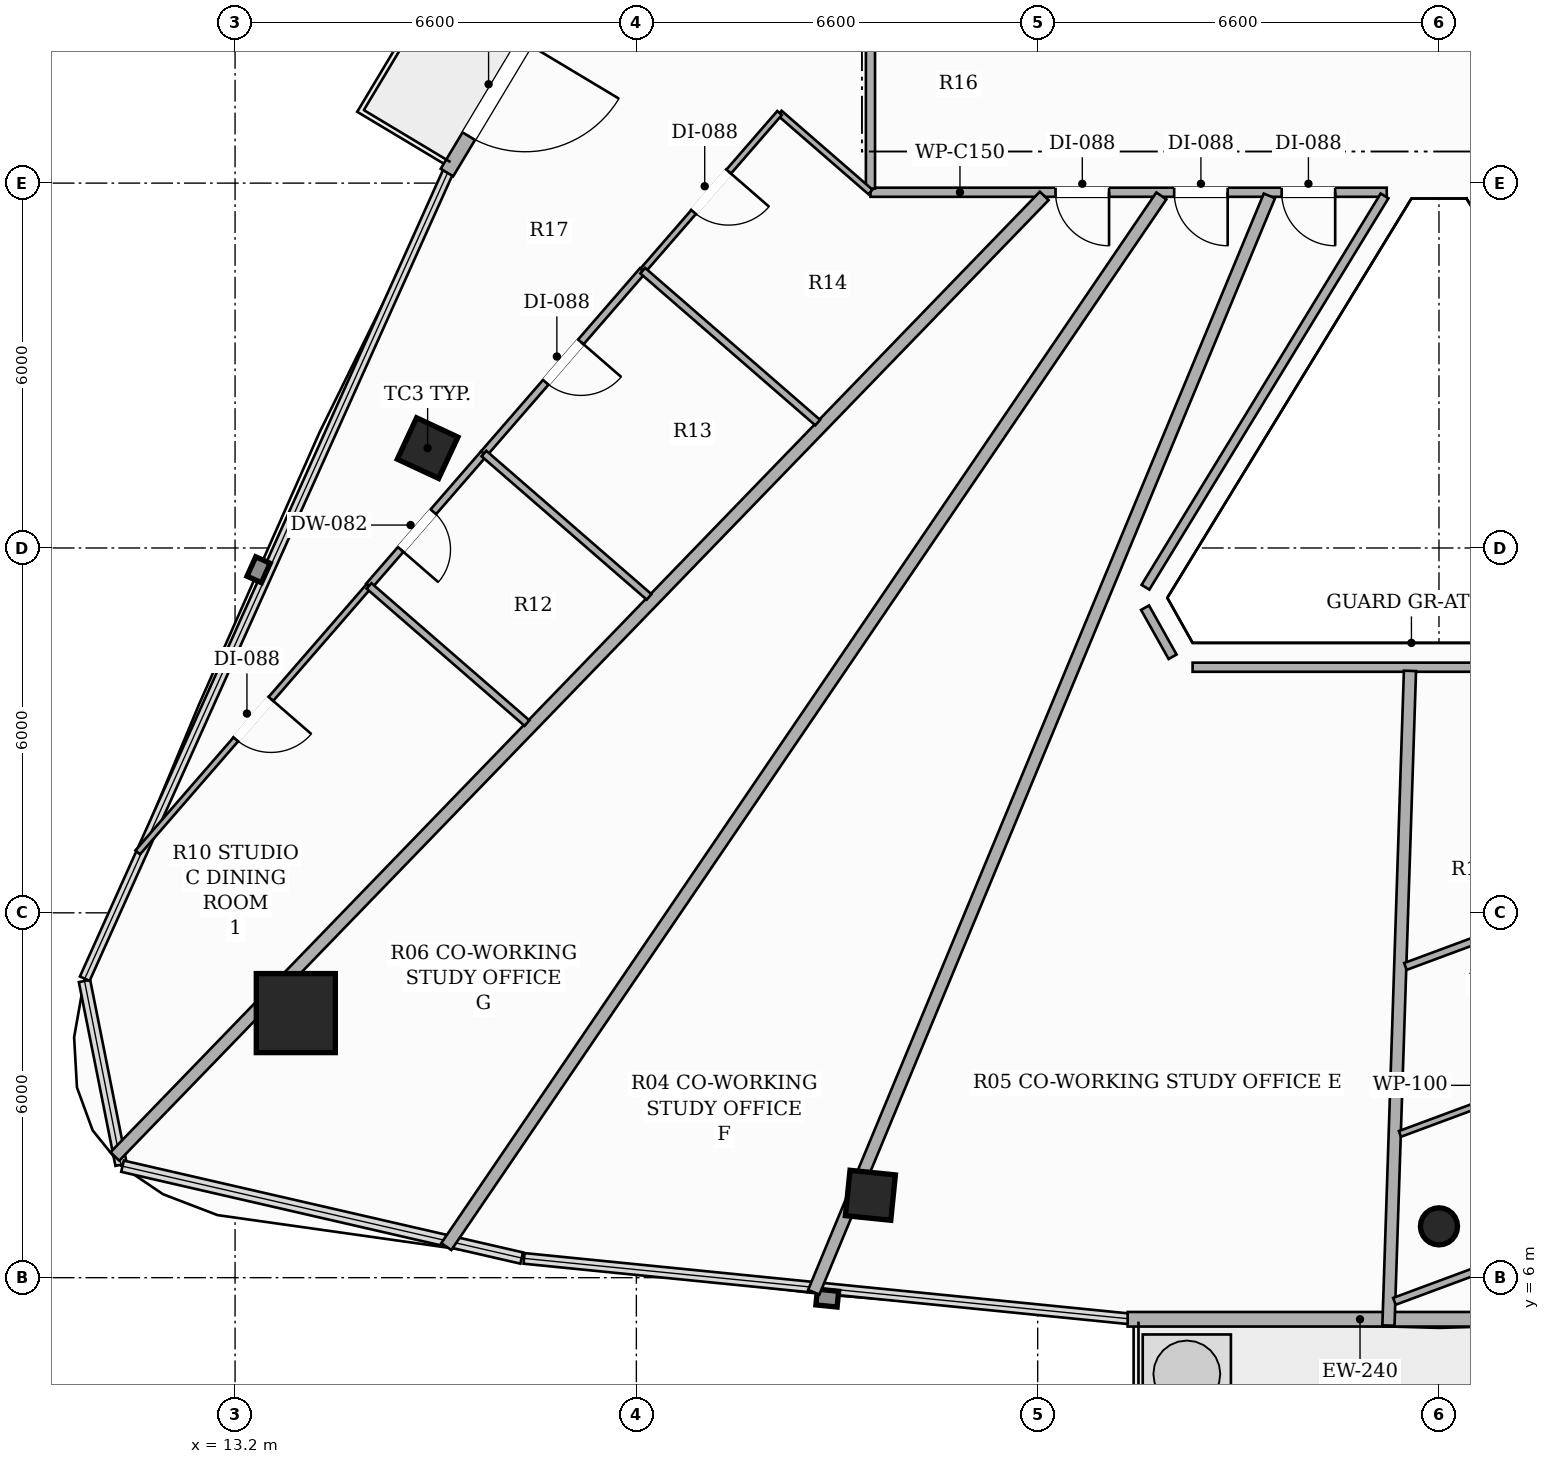
"""IFC4 building model, lengths in metres.
Left out: names, types, materials, properties, quantities, classifications, styles, units other than length and angle.
Written with IfcOpenShell. Run it as: python <this file> out.ifc"""

import sys

from ifc_helpers import new_model, si_unit, direction, frame, frame_2d, origin, origin_2d, place, context, subcontext, project, spatial, rectangle, hollow_rectangle, hollow_circle, extrude, element, fill, save


model = new_model("IFC4")
c1 = context("Model", 3, precision=1e-05, world=origin(), true_north=direction((0.0, 1.0)))
c2 = subcontext(c1, "Body", "Model", "MODEL_VIEW")
j1 = project(units=[si_unit("LENGTHUNIT", "METRE"), si_unit("PLANEANGLEUNIT", "RADIAN")], contexts=[c1])
p1 = place(None, origin())
s1 = spatial("IfcSite", under=j1, at=p1, CompositionType="ELEMENT")
p2 = place(p1, origin())
s2 = spatial("IfcBuilding", under=s1, at=p2, CompositionType="ELEMENT")
p3 = place(p2, frame((0.0, 0.0, 246.95)))
s3 = spatial("IfcBuildingStorey", under=s2, at=p3, CompositionType="ELEMENT", Elevation=246.95)
p4 = place(p3, frame((14.199, 10.351, 0.0), z_axis=(0.0, 0.0, 1.0), x_axis=(1.0, 0.0, 0.0)))
e1 = element("IfcColumn", 1, at=p4, inside=s3, PredefinedType="COLUMN", context=c2, shape_type="SweptSolid", body=[
    extrude(hollow_rectangle(XDim=1.3, YDim=1.3, WallThickness=0.04, at=origin_2d()), origin(), (0.0, 0.0, 1.0), 3.3),
])
for number, where, z_axis, x_axis in (
    (2, (16.367, 19.642, 0.0), (0.0, 0.0, 1.0), (0.423, 0.906, 0.0)),
    (3, (23.649, 7.355, 0.0), (0.0, 0.0, 1.0), (-0.995, 0.101, 0.0)),
):
    element("IfcColumn", number, at=place(p3, frame(where, z_axis=z_axis, x_axis=x_axis)), inside=s3, PredefinedType="COLUMN", context=c2, shape_type="SweptSolid", body=[
        extrude(hollow_rectangle(XDim=0.75, YDim=0.75, WallThickness=0.025, at=origin_2d()), origin(), (0.0, 0.0, 1.0), 3.3),
    ])
p5 = place(p3, frame((33.0, 6.844, 0.0), z_axis=(0.0, 0.0, 1.0), x_axis=(1.0, 0.0, 0.0)))
e4 = element("IfcColumn", 4, at=p5, inside=s3, PredefinedType="COLUMN", context=c2, shape_type="SweptSolid", body=[
    extrude(hollow_circle(Radius=0.305, WallThickness=0.016, at=origin_2d()), origin(), (0.0, 0.0, 1.0), 3.3),
])
p6 = place(p3, frame((21.775, 32.66, 0.0), z_axis=(0.0, 0.0, 1.0), x_axis=(-0.514372387577, -0.857566934354, 0.0)))
e5 = element("IfcWall", 5, at=p6, inside=s3, PredefinedType="SOLIDWALL", context=c2, shape_type="SweptSolid", body=[
    extrude(rectangle(XDim=9.895, YDim=0.24, at=frame_2d((4.948, 0.0))), origin(), (0.0, 0.0, 1.0), 2.624),
])
p7 = place(p6, frame((7.398, 0.0, 0.0)))
e6 = element("IfcOpeningElement", 6, at=p7, cuts=e5, PredefinedType="OPENING", context=c2, shape_type="SweptSolid", body=[
    extrude(rectangle(XDim=1.8, YDim=2.2, at=frame_2d((0.9, 1.1))), frame((0.0, 0.13, 0.0), z_axis=(0.0, -1.0, 0.0), x_axis=(1.0, 0.0, 0.0)), (0.0, 0.0, 1.0), 0.26),
])
p8 = place(p3, frame((27.88, 5.316, 0.0), z_axis=(0.0, 0.0, 1.0), x_axis=(1.0, 0.0, 0.0)))
e7 = element("IfcWall", 7, at=p8, inside=s3, PredefinedType="SOLIDWALL", context=c2, shape_type="SweptSolid", body=[
    extrude(rectangle(XDim=10.24, YDim=0.24, at=frame_2d((5.12, 0.0))), origin(), (0.0, 0.0, 1.0), 2.624),
])
p9 = place(p8, frame((7.743, 0.0, 0.0)))
e8 = element("IfcOpeningElement", 8, at=p9, cuts=e7, PredefinedType="OPENING", context=c2, shape_type="SweptSolid", body=[
    extrude(rectangle(XDim=1.8, YDim=2.2, at=frame_2d((0.9, 1.1))), frame((0.0, 0.13, 0.0), z_axis=(0.0, -1.0, 0.0), x_axis=(1.0, 0.0, 0.0)), (0.0, 0.0, 1.0), 0.26),
])
p10 = place(p3, frame((32.141, 23.85, 0.0), z_axis=(0.0, 0.0, 1.0), x_axis=(-1.0, 0.0, 0.0)))
e9 = element("IfcWall", 9, at=p10, inside=s3, PredefinedType="PARTITIONING", context=c2, shape_type="SweptSolid", body=[
    extrude(rectangle(XDim=8.491, YDim=0.15, at=frame_2d((4.246, 0.0))), origin(), (0.0, 0.0, 1.0), 2.565),
])
p11 = place(p10, frame((0.848, 0.0, 0.0)))
e10 = element("IfcOpeningElement", 10, at=p11, cuts=e9, PredefinedType="OPENING", context=c2, shape_type="SweptSolid", body=[
    extrude(rectangle(XDim=0.88, YDim=2.1, at=frame_2d((0.44, 1.05))), frame((0.0, 0.085, 0.0), z_axis=(0.0, -1.0, 0.0), x_axis=(1.0, 0.0, 0.0)), (0.0, 0.0, 1.0), 0.17),
])
p12 = place(p10, frame((2.616, 0.0, 0.0)))
e11 = element("IfcOpeningElement", 11, at=p12, cuts=e9, PredefinedType="OPENING", context=c2, shape_type="SweptSolid", body=[
    extrude(rectangle(XDim=0.88, YDim=2.1, at=frame_2d((0.44, 1.05))), frame((0.0, 0.085, 0.0), z_axis=(0.0, -1.0, 0.0), x_axis=(1.0, 0.0, 0.0)), (0.0, 0.0, 1.0), 0.17),
])
p13 = place(p10, frame((4.567, 0.0, 0.0)))
e12 = element("IfcOpeningElement", 12, at=p13, cuts=e9, PredefinedType="OPENING", context=c2, shape_type="SweptSolid", body=[
    extrude(rectangle(XDim=0.88, YDim=2.1, at=frame_2d((0.44, 1.05))), frame((0.0, 0.085, 0.0), z_axis=(0.0, -1.0, 0.0), x_axis=(1.0, 0.0, 0.0)), (0.0, 0.0, 1.0), 0.17),
])
p14 = place(p3, frame((23.65, 23.91, 0.0), z_axis=(0.0, 0.0, 1.0), x_axis=(0.0, 1.0, 0.0)))
e13 = element("IfcWall", 13, at=p14, inside=s3, PredefinedType="PARTITIONING", context=c2, shape_type="SweptSolid", body=[
    extrude(rectangle(XDim=11.337, YDim=0.15, at=frame_2d((5.668, 0.0))), origin(), (0.0, 0.0, 1.0), 2.492),
])
p15 = place(p14, frame((4.694, 0.0, 0.0)))
e14 = element("IfcOpeningElement", 14, at=p15, cuts=e13, PredefinedType="OPENING", context=c2, shape_type="SweptSolid", body=[
    extrude(rectangle(XDim=0.92, YDim=2.15, at=frame_2d((0.46, 1.075))), frame((0.0, 0.085, 0.0), z_axis=(0.0, -1.0, 0.0), x_axis=(1.0, 0.0, 0.0)), (0.0, 0.0, 1.0), 0.17),
])
p16 = place(p3, frame((37.052, 16.039, 0.0), z_axis=(0.0, 0.0, 1.0), x_axis=(-1.0, 0.0, 0.0)))
e15 = element("IfcWall", 15, at=p16, inside=s3, PredefinedType="PARTITIONING", context=c2, shape_type="SweptSolid", body=[
    extrude(rectangle(XDim=8.104, YDim=0.15, at=frame_2d((4.052, 0.0))), origin(), (0.0, 0.0, 1.0), 2.773),
])
p17 = place(p3, frame((28.619, 16.211, 0.0), z_axis=(0.0, 0.0, 1.0), x_axis=(-0.489334167997, 0.872096366252, 0.0)))
e16 = element("IfcWall", 16, at=p17, inside=s3, PredefinedType="PARTITIONING", context=c2, shape_type="SweptSolid", body=[
    extrude(rectangle(XDim=0.926, YDim=0.15, at=frame_2d((0.463, 0.0))), origin(), (0.0, 0.0, 1.0), 3.06),
])
p18 = place(p3, frame((28.173, 17.354, 0.0), z_axis=(0.0, 0.0, 1.0), x_axis=(0.521329541742, 0.85335544113, 0.0)))
e17 = element("IfcWall", 17, at=p18, inside=s3, PredefinedType="PARTITIONING", context=c2, shape_type="SweptSolid", body=[
    extrude(rectangle(XDim=7.542, YDim=0.15, at=frame_2d((3.771, 0.0))), origin(), (0.0, 0.0, 1.0), 2.773),
])
p19 = place(p3, frame((32.169, 5.213, 0.0), z_axis=(0.0, 0.0, 1.0), x_axis=(0.032863548895, 0.999459847695, 0.0)))
e18 = element("IfcWall", 18, at=p19, inside=s3, PredefinedType="PARTITIONING", context=c2, shape_type="SweptSolid", body=[
    extrude(rectangle(XDim=10.772, YDim=0.2, at=frame_2d((5.386, 0.0))), origin(), (0.0, 0.0, 1.0), 2.492),
])
p20 = place(p3, frame((26.508, 23.79, 0.0), z_axis=(0.0, 0.0, 1.0), x_axis=(-0.695365551949, -0.71865621069, 0.0)))
e19 = element("IfcWall", 19, at=p20, inside=s3, PredefinedType="PARTITIONING", context=c2, shape_type="SweptSolid", body=[
    extrude(rectangle(XDim=21.981, YDim=0.2, at=frame_2d((10.991, 0.0))), origin(), (0.0, 0.0, 1.0), 2.492),
])
p21 = place(p3, frame((22.717, 5.761, 0.0), z_axis=(0.0, 0.0, 1.0), x_axis=(0.383820587854, 0.923407686961, 0.0)))
e20 = element("IfcWall", 20, at=p21, inside=s3, PredefinedType="PARTITIONING", context=c2, shape_type="SweptSolid", body=[
    extrude(rectangle(XDim=19.524, YDim=0.2, at=frame_2d((9.762, 0.0))), origin(), (0.0, 0.0, 1.0), 2.492),
])
p22 = place(p3, frame((16.674, 6.511, 0.0), z_axis=(0.0, 0.0, 1.0), x_axis=(0.562645442508, 0.82669831621, 0.0)))
e21 = element("IfcWall", 21, at=p22, inside=s3, PredefinedType="PARTITIONING", context=c2, shape_type="SweptSolid", body=[
    extrude(rectangle(XDim=20.901, YDim=0.2, at=frame_2d((10.451, 0.0))), origin(), (0.0, 0.0, 1.0), 2.492),
])
p23 = place(p3, frame((35.781, 12.353, 0.0), z_axis=(0.0, 0.0, 1.0), x_axis=(-0.937688263894, -0.347477653607, 0.0)))
e22 = element("IfcWall", 22, at=p23, inside=s3, PredefinedType="PARTITIONING", context=c2, shape_type="SweptSolid", body=[
    extrude(rectangle(XDim=3.554, YDim=0.12, at=frame_2d((1.777, 0.0))), origin(), (0.0, 0.0, 1.0), 2.773),
])
p24 = place(p3, frame((32.267, 5.611, 0.0), z_axis=(0.0, 0.0, 1.0), x_axis=(0.937641120959, 0.347604845027, 0.0)))
e23 = element("IfcWall", 23, at=p24, inside=s3, PredefinedType="PARTITIONING", context=c2, shape_type="SweptSolid", body=[
    extrude(rectangle(XDim=5.638, YDim=0.12, at=frame_2d((2.819, 0.0))), origin(), (0.0, 0.0, 1.0), 2.492),
])
p25 = place(p3, frame((32.358, 8.364, 0.0), z_axis=(0.0, 0.0, 1.0), x_axis=(0.937636593966, 0.34761705605, 0.0)))
e24 = element("IfcWall", 24, at=p25, inside=s3, PredefinedType="PARTITIONING", context=c2, shape_type="SweptSolid", body=[
    extrude(rectangle(XDim=4.597, YDim=0.1, at=frame_2d((2.298, 0.0))), origin(), (0.0, 0.0, 1.0), 2.773),
])
p26 = place(p3, frame((17.293, 19.553, 0.0), z_axis=(0.0, 0.0, 1.0), x_axis=(-0.655555788219, -0.755146746357, 0.0)))
e25 = element("IfcWall", 25, at=p26, inside=s3, PredefinedType="PARTITIONING", context=c2, shape_type="SweptSolid", body=[
    extrude(rectangle(XDim=2.883, YDim=0.12, at=frame_2d((1.441, 0.0))), origin(), (0.0, 0.0, 1.0), 2.492),
])
p27 = place(p26, frame((1.269, 0.0, 0.0)))
e26 = element("IfcOpeningElement", 26, at=p27, cuts=e25, PredefinedType="OPENING", context=c2, shape_type="SweptSolid", body=[
    extrude(rectangle(XDim=0.82, YDim=2.1, at=frame_2d((0.41, 1.05))), frame((0.0, 0.07, 0.0), z_axis=(0.0, -1.0, 0.0), x_axis=(1.0, 0.0, 0.0)), (0.0, 0.0, 1.0), 0.14),
])
p28 = place(p3, frame((19.904, 22.561, 0.0), z_axis=(0.0, 0.0, 1.0), x_axis=(-0.655518370372, -0.755179227803, 0.0)))
e27 = element("IfcWall", 27, at=p28, inside=s3, PredefinedType="PARTITIONING", context=c2, shape_type="SweptSolid", body=[
    extrude(rectangle(XDim=3.983, YDim=0.12, at=frame_2d((1.992, 0.0))), origin(), (0.0, 0.0, 1.0), 2.773),
])
p29 = place(p28, frame((1.552, 0.0, 0.0)))
e28 = element("IfcOpeningElement", 28, at=p29, cuts=e27, PredefinedType="OPENING", context=c2, shape_type="SweptSolid", body=[
    extrude(rectangle(XDim=0.88, YDim=2.1, at=frame_2d((0.44, 1.05))), frame((0.0, 0.07, 0.0), z_axis=(0.0, -1.0, 0.0), x_axis=(1.0, 0.0, 0.0)), (0.0, 0.0, 1.0), 0.14),
])
p30 = place(p3, frame((15.403, 17.376, 0.0), z_axis=(0.0, 0.0, 1.0), x_axis=(-0.655535791639, -0.755164105265, 0.0)))
e29 = element("IfcWall", 29, at=p30, inside=s3, PredefinedType="PARTITIONING", context=c2, shape_type="SweptSolid", body=[
    extrude(rectangle(XDim=5.803, YDim=0.1, at=frame_2d((2.901, 0.0))), origin(), (0.0, 0.0, 1.0), 2.492),
])
p31 = place(p30, frame((2.461, 0.0, 0.0)))
e30 = element("IfcOpeningElement", 30, at=p31, cuts=e29, PredefinedType="OPENING", context=c2, shape_type="SweptSolid", body=[
    extrude(rectangle(XDim=0.88, YDim=2.1, at=frame_2d((0.44, 1.05))), frame((0.0, 0.06, 0.0), z_axis=(0.0, -1.0, 0.0), x_axis=(1.0, 0.0, 0.0)), (0.0, 0.0, 1.0), 0.12),
])
p32 = place(p3, frame((23.65, 23.855, 0.0), z_axis=(0.0, 0.0, 1.0), x_axis=(-0.755054003076, 0.655662605643, 0.0)))
e31 = element("IfcWall", 31, at=p32, inside=s3, PredefinedType="PARTITIONING", context=c2, shape_type="SweptSolid", body=[
    extrude(rectangle(XDim=1.98, YDim=0.1, at=frame_2d((0.99, 0.0))), origin(), (0.0, 0.0, 1.0), 2.773),
])
p33 = place(p3, frame((22.155, 25.153, 0.0), z_axis=(0.0, 0.0, 1.0), x_axis=(-0.655685588572, -0.755034044888, 0.0)))
e32 = element("IfcWall", 32, at=p33, inside=s3, PredefinedType="PARTITIONING", context=c2, shape_type="SweptSolid", body=[
    extrude(rectangle(XDim=3.433, YDim=0.1, at=frame_2d((1.717, 0.0))), origin(), (0.0, 0.0, 1.0), 2.773),
])
p34 = place(p33, frame((1.276, 0.0, 0.0)))
e33 = element("IfcOpeningElement", 33, at=p34, cuts=e32, PredefinedType="OPENING", context=c2, shape_type="SweptSolid", body=[
    extrude(rectangle(XDim=0.88, YDim=2.1, at=frame_2d((0.44, 1.05))), frame((0.0, 0.06, 0.0), z_axis=(0.0, -1.0, 0.0), x_axis=(1.0, 0.0, 0.0)), (0.0, 0.0, 1.0), 0.12),
])
p35 = place(p3, frame((17.293, 19.553, 0.0), z_axis=(0.0, 0.0, 1.0), x_axis=(0.755140110276, -0.655563432364, 0.0)))
e34 = element("IfcWall", 34, at=p35, inside=s3, PredefinedType="PARTITIONING", context=c2, shape_type="SweptSolid", body=[
    extrude(rectangle(XDim=3.597, YDim=0.12, at=frame_2d((1.798, 0.0))), origin(), (0.0, 0.0, 1.0), 2.565),
])
p36 = place(p3, frame((18.001, 15.12, 0.0), z_axis=(0.0, 0.0, 1.0), x_axis=(-0.755063624175, 0.655651525925, 0.0)))
e35 = element("IfcWall", 35, at=p36, inside=s3, PredefinedType="PARTITIONING", context=c2, shape_type="SweptSolid", body=[
    extrude(rectangle(XDim=3.441, YDim=0.12, at=frame_2d((1.72, 0.0))), origin(), (0.0, 0.0, 1.0), 2.492),
])
p37 = place(p3, frame((19.904, 22.561, 0.0), z_axis=(0.0, 0.0, 1.0), x_axis=(0.755063159293, -0.655652061293, 0.0)))
e36 = element("IfcWall", 36, at=p37, inside=s3, PredefinedType="PARTITIONING", context=c2, shape_type="SweptSolid", body=[
    extrude(rectangle(XDim=3.812, YDim=0.12, at=frame_2d((1.906, 0.0))), origin(), (0.0, 0.0, 1.0), 2.565),
])
p38 = place(p7, origin())
e37 = element("IfcDoor", 37, at=p38, inside=s3, OperationType="SINGLE_SWING_LEFT", PredefinedType="DOOR", context=c2, shape_type="SweptSolid", body=[
    extrude(rectangle(XDim=1.8, YDim=2.2, at=frame_2d((0.9, 1.1))), frame((0.0, 0.025, 0.0), z_axis=(0.0, -1.0, 0.0), x_axis=(1.0, 0.0, 0.0)), (0.0, 0.0, 1.0), 0.05),
])
fill(e6, e37)
p39 = place(p27, origin())
e38 = element("IfcDoor", 38, at=p39, inside=s3, OperationType="SINGLE_SWING_RIGHT", PredefinedType="DOOR", context=c2, shape_type="SweptSolid", body=[
    extrude(rectangle(XDim=0.82, YDim=2.1, at=frame_2d((0.41, 1.05))), frame((0.0, 0.025, 0.0), z_axis=(0.0, -1.0, 0.0), x_axis=(1.0, 0.0, 0.0)), (0.0, 0.0, 1.0), 0.05),
])
fill(e26, e38)
p40 = place(p29, origin())
e39 = element("IfcDoor", 39, at=p40, inside=s3, OperationType="SINGLE_SWING_LEFT", PredefinedType="DOOR", context=c2, shape_type="SweptSolid", body=[
    extrude(rectangle(XDim=0.88, YDim=2.1, at=frame_2d((0.44, 1.05))), frame((0.0, 0.025, 0.0), z_axis=(0.0, -1.0, 0.0), x_axis=(1.0, 0.0, 0.0)), (0.0, 0.0, 1.0), 0.05),
])
fill(e28, e39)
p41 = place(p31, origin())
e40 = element("IfcDoor", 40, at=p41, inside=s3, OperationType="SINGLE_SWING_LEFT", PredefinedType="DOOR", context=c2, shape_type="SweptSolid", body=[
    extrude(rectangle(XDim=0.88, YDim=2.1, at=frame_2d((0.44, 1.05))), frame((0.0, 0.025, 0.0), z_axis=(0.0, -1.0, 0.0), x_axis=(1.0, 0.0, 0.0)), (0.0, 0.0, 1.0), 0.05),
])
fill(e30, e40)
p42 = place(p34, origin())
e41 = element("IfcDoor", 41, at=p42, inside=s3, OperationType="SINGLE_SWING_LEFT", PredefinedType="DOOR", context=c2, shape_type="SweptSolid", body=[
    extrude(rectangle(XDim=0.88, YDim=2.1, at=frame_2d((0.44, 1.05))), frame((0.0, 0.025, 0.0), z_axis=(0.0, -1.0, 0.0), x_axis=(1.0, 0.0, 0.0)), (0.0, 0.0, 1.0), 0.05),
])
fill(e33, e41)
p43 = place(p11, origin())
e42 = element("IfcDoor", 42, at=p43, inside=s3, OperationType="SINGLE_SWING_LEFT", PredefinedType="DOOR", context=c2, shape_type="SweptSolid", body=[
    extrude(rectangle(XDim=0.88, YDim=2.1, at=frame_2d((0.44, 1.05))), frame((0.0, 0.025, 0.0), z_axis=(0.0, -1.0, 0.0), x_axis=(1.0, 0.0, 0.0)), (0.0, 0.0, 1.0), 0.05),
])
fill(e10, e42)
p44 = place(p12, origin())
e43 = element("IfcDoor", 43, at=p44, inside=s3, OperationType="SINGLE_SWING_LEFT", PredefinedType="DOOR", context=c2, shape_type="SweptSolid", body=[
    extrude(rectangle(XDim=0.88, YDim=2.1, at=frame_2d((0.44, 1.05))), frame((0.0, 0.025, 0.0), z_axis=(0.0, -1.0, 0.0), x_axis=(1.0, 0.0, 0.0)), (0.0, 0.0, 1.0), 0.05),
])
fill(e11, e43)
p45 = place(p13, origin())
e44 = element("IfcDoor", 44, at=p45, inside=s3, OperationType="SINGLE_SWING_LEFT", PredefinedType="DOOR", context=c2, shape_type="SweptSolid", body=[
    extrude(rectangle(XDim=0.88, YDim=2.1, at=frame_2d((0.44, 1.05))), frame((0.0, 0.025, 0.0), z_axis=(0.0, -1.0, 0.0), x_axis=(1.0, 0.0, 0.0)), (0.0, 0.0, 1.0), 0.05),
])
fill(e12, e44)
save(model, sys.argv[1])
